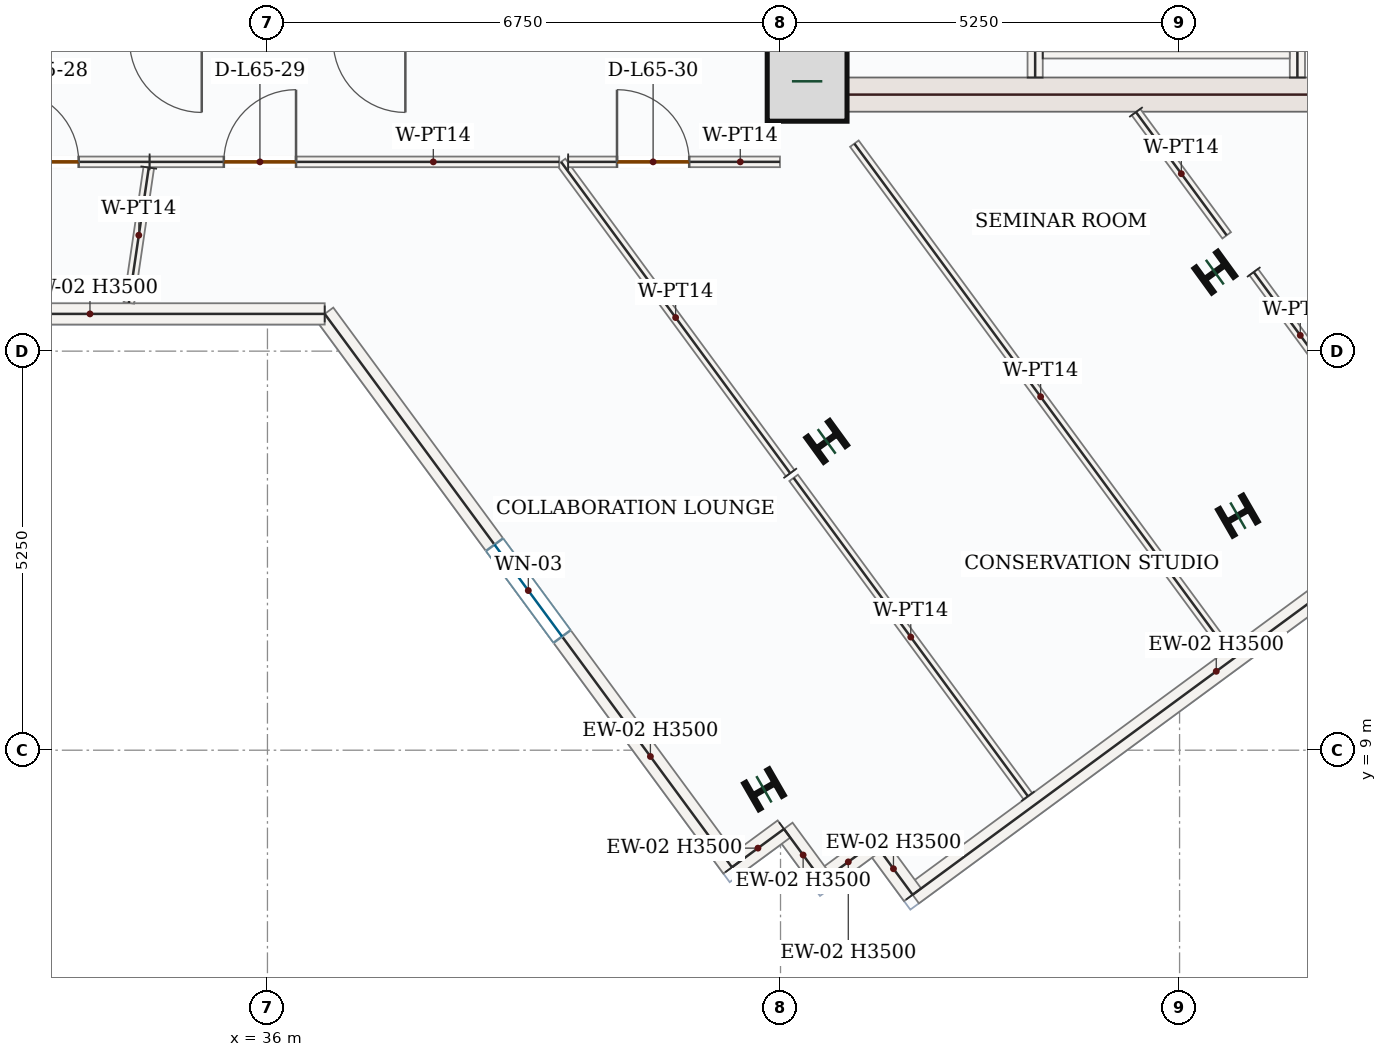
"""IFC4 building model, lengths in metres.
Left out: names, types, materials, properties, quantities, classifications, styles, units other than length and angle.
Written with IfcOpenShell. Run it as: python <this file> out.ifc"""

import sys

from ifc_helpers import new_model, si_unit, direction, frame, frame_2d, origin, origin_2d, place, context, subcontext, project, spatial, rectangle, i_section, extrude, source, transform, mapped, element, fill, save


model = new_model("IFC4")
c1 = context("Model", 3, precision=1e-05, world=origin(), true_north=direction((0.0, 1.0)))
c2 = subcontext(c1, "Body", "Model", "MODEL_VIEW")
j1 = project(units=[si_unit("LENGTHUNIT", "METRE"), si_unit("PLANEANGLEUNIT", "RADIAN")], contexts=[c1])
p1 = place(None, origin())
s1 = spatial("IfcSite", under=j1, at=p1, CompositionType="ELEMENT")
p2 = place(p1, origin())
s2 = spatial("IfcBuilding", under=s1, at=p2, CompositionType="ELEMENT")
p3 = place(p2, frame((0.0, 0.0, 272.85)))
s3 = spatial("IfcBuildingStorey", under=s2, at=p3, CompositionType="ELEMENT", Elevation=272.85)
p4 = place(p3, frame((42.975, 17.4, 0.0), z_axis=(0.0, 0.0, 1.0), x_axis=(0.0, 1.0, 0.0)))
e1 = element("IfcWall", 1, at=p4, inside=s3, PredefinedType="SHEAR", context=c2, shape_type="SweptSolid", body=[
    extrude(rectangle(XDim=8.55, YDim=0.45, at=frame_2d((4.275, 0.0))), origin(), (0.0, 0.0, 1.0), 3.5),
])
p5 = place(p4, frame((6.65, 0.0, 0.0)))
e2 = element("IfcOpeningElement", 2, at=p5, cuts=e1, PredefinedType="OPENING", context=c2, shape_type="SweptSolid", body=[
    extrude(rectangle(XDim=1.1, YDim=2.2, at=frame_2d((0.55, 1.1))), frame((0.0, 0.235, 0.0), z_axis=(0.0, -1.0, 0.0), x_axis=(1.0, 0.0, 0.0)), (0.0, 0.0, 1.0), 0.47),
])
p6 = place(p4, frame((1.75, 0.0, 0.0)))
e3 = element("IfcOpeningElement", 3, at=p6, cuts=e1, PredefinedType="OPENING", context=c2, shape_type="SweptSolid", body=[
    extrude(rectangle(XDim=1.3, YDim=2.2, at=frame_2d((0.65, 1.1))), frame((0.0, 0.235, 0.0), z_axis=(0.0, -1.0, 0.0), x_axis=(1.0, 0.0, 0.0)), (0.0, 0.0, 1.0), 0.47),
])
p7 = place(p4, frame((4.3, 0.0, 0.0)))
e4 = element("IfcOpeningElement", 4, at=p7, cuts=e1, PredefinedType="OPENING", context=c2, shape_type="SweptSolid", body=[
    extrude(rectangle(XDim=0.88, YDim=2.1, at=frame_2d((0.44, 1.05))), frame((0.0, 0.235, 0.0), z_axis=(0.0, -1.0, 0.0), x_axis=(1.0, 0.0, 0.0)), (0.0, 0.0, 1.0), 0.47),
])
m1 = source(origin(), c2, "Body", "SweptSolid", [
    extrude(rectangle(XDim=7.1, YDim=0.45, at=frame_2d((3.55, 0.0))), origin(), (0.0, 0.0, 1.0), 3.5),
])
p8 = place(p3, frame((43.2, 17.625, 0.0), z_axis=(0.0, 0.0, 1.0), x_axis=(1.0, 0.0, 0.0)))
e5 = element("IfcWall", 5, at=p8, inside=s3, PredefinedType="SHEAR", context=c2, shape_type="MappedRepresentation", body=[
    mapped(m1, transform((0.0, 0.0, 0.0), x_axis=(1.0, 0.0, 0.0), y_axis=(0.0, 1.0, 0.0), z_axis=(0.0, 0.0, 1.0), scale=1.0)),
])
m2 = source(origin(), c2, "Body", "SweptSolid", [
    extrude(rectangle(XDim=1.05, YDim=1.05, at=origin_2d()), origin(), (0.0, 0.0, 1.0), 3.75),
])
p9 = place(p3, frame((43.1, 17.8, 0.0), z_axis=(0.0, 0.0, 1.0), x_axis=(1.0, 0.0, 0.0)))
e6 = element("IfcColumn", 6, at=p9, inside=s3, PredefinedType="COLUMN", context=c2, shape_type="MappedRepresentation", body=[
    mapped(m2, transform((0.0, 0.0, 0.0), x_axis=(1.0, 0.0, 0.0), y_axis=(0.0, 1.0, 0.0), z_axis=(0.0, 0.0, 1.0), scale=1.0)),
])
m3 = source(origin(), c2, "Body", "SweptSolid", [
    extrude(i_section(OverallWidth=0.399, OverallDepth=0.386, WebThickness=0.021, FlangeThickness=0.033, FilletRadius=0.018, at=origin_2d()), origin(), (0.0, 0.0, 1.0), 3.75),
])
for number, where, z_axis, x_axis in (
    (7, (43.357, 13.063, 0.0), (0.0, 0.0, 1.0), (-0.588, 0.809, 0.0)),
    (8, (48.464, 15.289, 0.0), (0.0, 0.0, 1.0), (-0.588, 0.809, 0.0)),
    (9, (42.532, 8.486, 0.0), (0.0, 0.0, 1.0), (-0.5, 0.866, 0.0)),
    (10, (48.768, 12.086, 0.0), (0.0, 0.0, 1.0), (-0.5, 0.866, 0.0)),
):
    element("IfcColumn", number, at=place(p3, frame(where, z_axis=z_axis, x_axis=x_axis)), inside=s3, PredefinedType="COLUMN", context=c2, shape_type="MappedRepresentation", body=[
        mapped(m3, transform((0.0, 0.0, 0.0), x_axis=(1.0, 0.0, 0.0), y_axis=(0.0, 1.0, 0.0), z_axis=(0.0, 0.0, 1.0), scale=1.0)),
    ])
m4 = source(origin(), c2, "Body", "SweptSolid", [
    extrude(rectangle(XDim=9.92, YDim=0.28, at=frame_2d((4.96, 0.0))), origin(), (0.0, 0.0, 1.0), 3.5),
])
p10 = place(p3, frame((52.478, 12.978, 0.0), z_axis=(0.0, 0.0, 1.0), x_axis=(-0.805418797839, -0.592706132994, 0.0)))
e11 = element("IfcWall", 11, at=p10, inside=s3, PredefinedType="SOLIDWALL", context=c2, shape_type="MappedRepresentation", body=[
    mapped(m4, transform((0.0, 0.0, 0.0), x_axis=(1.0, 0.0, 0.0), y_axis=(0.0, 1.0, 0.0), z_axis=(0.0, 0.0, 1.0), scale=1.0)),
])
m5 = source(origin(), c2, "Body", "SweptSolid", [
    extrude(rectangle(XDim=0.85, YDim=0.28, at=frame_2d((0.425, 0.0))), origin(), (0.0, 0.0, 1.0), 3.5),
])
for number, where, z_axis, x_axis in (
    (12, (44.488, 7.098, 0.0), (0.0, 0.0, 1.0), (-0.593, 0.805, 0.0)),
    (13, (43.984, 7.783, 0.0), (0.0, 0.0, 1.0), (-0.805, -0.593, 0.0)),
):
    element("IfcWall", number, at=place(p3, frame(where, z_axis=z_axis, x_axis=x_axis)), inside=s3, PredefinedType="SOLIDWALL", context=c2, shape_type="MappedRepresentation", body=[
        mapped(m5, transform((0.0, 0.0, 0.0), x_axis=(1.0, 0.0, 0.0), y_axis=(0.0, 1.0, 0.0), z_axis=(0.0, 0.0, 1.0), scale=1.0)),
    ])
m6 = source(origin(), c2, "Body", "SweptSolid", [
    extrude(rectangle(XDim=0.85, YDim=0.28, at=frame_2d((0.425, 0.0))), origin(), (0.0, 0.0, 1.0), 3.5),
])
for number, where, z_axis, x_axis in (
    (14, (43.299, 7.279, 0.0), (0.0, 0.0, 1.0), (-0.593, 0.805, 0.0)),
    (15, (42.796, 7.963, 0.0), (0.0, 0.0, 1.0), (-0.805, -0.593, 0.0)),
):
    element("IfcWall", number, at=place(p3, frame(where, z_axis=z_axis, x_axis=x_axis)), inside=s3, PredefinedType="SOLIDWALL", context=c2, shape_type="MappedRepresentation", body=[
        mapped(m6, transform((0.0, 0.0, 0.0), x_axis=(1.0, 0.0, 0.0), y_axis=(0.0, 1.0, 0.0), z_axis=(0.0, 0.0, 1.0), scale=1.0)),
    ])
p11 = place(p3, frame((42.111, 7.46, 0.0), z_axis=(0.0, 0.0, 1.0), x_axis=(-0.592715239748, 0.805412096117, 0.0)))
e16 = element("IfcWall", 16, at=p11, inside=s3, PredefinedType="SOLIDWALL", context=c2, shape_type="SweptSolid", body=[
    extrude(rectangle(XDim=9.039, YDim=0.28, at=frame_2d((4.52, 0.0))), origin(), (0.0, 0.0, 1.0), 3.5),
])
p12 = place(p11, frame((3.77, 0.0, 0.85)))
e17 = element("IfcOpeningElement", 17, at=p12, cuts=e16, PredefinedType="OPENING", context=c2, shape_type="SweptSolid", body=[
    extrude(rectangle(XDim=1.5, YDim=1.5, at=frame_2d((0.75, 0.75))), frame((0.0, 0.15, 0.0), z_axis=(0.0, -1.0, 0.0), x_axis=(1.0, 0.0, 0.0)), (0.0, 0.0, 1.0), 0.3),
])
m7 = source(origin(), c2, "Body", "SweptSolid", [
    extrude(rectangle(XDim=6.177, YDim=0.28, at=frame_2d((3.088, 0.0))), origin(), (0.0, 0.0, 1.0), 3.5),
])
p13 = place(p3, frame((36.753, 14.74, 0.0), z_axis=(0.0, 0.0, 1.0), x_axis=(-1.0, 0.0, 0.0)))
e18 = element("IfcWall", 18, at=p13, inside=s3, PredefinedType="SOLIDWALL", context=c2, shape_type="MappedRepresentation", body=[
    mapped(m7, transform((0.0, 0.0, 0.0), x_axis=(1.0, 0.0, 0.0), y_axis=(0.0, 1.0, 0.0), z_axis=(0.0, 0.0, 1.0), scale=1.0)),
])
m8 = source(origin(), c2, "Body", "SweptSolid", [
    extrude(rectangle(XDim=7.87, YDim=0.2, at=frame_2d((3.935, 0.0))), origin(), (0.0, 0.0, 1.0), 3.5),
])
p14 = place(p3, frame((49.55, 17.85, 0.0), z_axis=(0.0, 0.0, 1.0), x_axis=(0.0, 1.0, 0.0)))
e19 = element("IfcWall", 19, at=p14, inside=s3, PredefinedType="SOLIDWALL", context=c2, shape_type="MappedRepresentation", body=[
    mapped(m8, transform((0.0, 0.0, 0.0), x_axis=(1.0, 0.0, 0.0), y_axis=(0.0, 1.0, 0.0), z_axis=(0.0, 0.0, 1.0), scale=1.0)),
])
p15 = place(p3, frame((46.1, 17.85, 0.0), z_axis=(0.0, 0.0, 1.0), x_axis=(0.0, 1.0, 0.0)))
e20 = element("IfcWall", 20, at=p15, inside=s3, PredefinedType="SOLIDWALL", context=c2, shape_type="SweptSolid", body=[
    extrude(rectangle(XDim=8.0, YDim=0.2, at=frame_2d((4.0, 0.0))), origin(), (0.0, 0.0, 1.0), 3.5),
])
p16 = place(p15, frame((6.3, 0.0, 0.0)))
e21 = element("IfcOpeningElement", 21, at=p16, cuts=e20, PredefinedType="OPENING", context=c2, shape_type="SweptSolid", body=[
    extrude(rectangle(XDim=1.05, YDim=2.15, at=frame_2d((0.525, 1.075))), frame((0.0, 0.11, 0.0), z_axis=(0.0, -1.0, 0.0), x_axis=(1.0, 0.0, 0.0)), (0.0, 0.0, 1.0), 0.22),
])
m9 = source(origin(), c2, "Body", "SweptSolid", [
    extrude(rectangle(XDim=3.25, YDim=0.2, at=frame_2d((1.625, 0.0))), origin(), (0.0, 0.0, 1.0), 3.5),
])
p17 = place(p3, frame((46.2, 18.2, 0.0), z_axis=(0.0, 0.0, 1.0), x_axis=(1.0, 0.0, 0.0)))
e22 = element("IfcWall", 22, at=p17, inside=s3, PredefinedType="SOLIDWALL", context=c2, shape_type="MappedRepresentation", body=[
    mapped(m9, transform((0.0, 0.0, 0.0), x_axis=(1.0, 0.0, 0.0), y_axis=(0.0, 1.0, 0.0), z_axis=(0.0, 0.0, 1.0), scale=1.0)),
])
m10 = source(origin(), c2, "Body", "SweptSolid", [
    extrude(rectangle(XDim=8.268, YDim=0.14, at=frame_2d((4.134, 0.0))), origin(), (0.0, 0.0, 1.0), 3.5),
])
p18 = place(p3, frame((48.622, 10.321, 0.0), z_axis=(0.0, 0.0, 1.0), x_axis=(-0.592718477136, 0.805409713663, 0.0)))
e23 = element("IfcWall", 23, at=p18, inside=s3, PredefinedType="PARTITIONING", context=c2, shape_type="MappedRepresentation", body=[
    mapped(m10, transform((0.0, 0.0, 0.0), x_axis=(1.0, 0.0, 0.0), y_axis=(0.0, 1.0, 0.0), z_axis=(0.0, 0.0, 1.0), scale=1.0)),
])
m11 = source(origin(), c2, "Body", "SweptSolid", [
    extrude(rectangle(XDim=2.013, YDim=0.14, at=frame_2d((1.006, 0.0))), origin(), (0.0, 0.0, 1.0), 3.5),
])
p19 = place(p3, frame((47.427, 17.395, 0.0), z_axis=(0.0, 0.0, 1.0), x_axis=(0.592698341467, -0.80542453155, 0.0)))
e24 = element("IfcWall", 24, at=p19, inside=s3, PredefinedType="PARTITIONING", context=c2, shape_type="MappedRepresentation", body=[
    mapped(m11, transform((0.0, 0.0, 0.0), x_axis=(1.0, 0.0, 0.0), y_axis=(0.0, 1.0, 0.0), z_axis=(0.0, 0.0, 1.0), scale=1.0)),
])
p20 = place(p3, frame((48.975, 15.29, 0.0), z_axis=(0.0, 0.0, 1.0), x_axis=(0.592735674873, -0.805397057192, 0.0)))
e25 = element("IfcWall", 25, at=p20, inside=s3, PredefinedType="PARTITIONING", context=c2, shape_type="SweptSolid", body=[
    extrude(rectangle(XDim=3.793, YDim=0.14, at=frame_2d((1.896, 0.0))), origin(), (0.0, 0.0, 1.0), 3.5),
])
p21 = place(p20, frame((2.218, 0.0, 0.0)))
e26 = element("IfcOpeningElement", 26, at=p21, cuts=e25, PredefinedType="OPENING", context=c2, shape_type="SweptSolid", body=[
    extrude(rectangle(XDim=0.95, YDim=2.15, at=frame_2d((0.475, 1.075))), frame((0.0, 0.08, 0.0), z_axis=(0.0, -1.0, 0.0), x_axis=(1.0, 0.0, 0.0)), (0.0, 0.0, 1.0), 0.16),
])
m12 = source(origin(), c2, "Body", "SweptSolid", [
    extrude(rectangle(XDim=5.2, YDim=0.14, at=frame_2d((2.6, 0.0))), origin(), (0.0, 0.0, 1.0), 3.5),
])
p22 = place(p3, frame((46.005, 8.394, 0.0), z_axis=(0.0, 0.0, 1.0), x_axis=(-0.592704087561, 0.805420303065, 0.0)))
e27 = element("IfcWall", 27, at=p22, inside=s3, PredefinedType="PARTITIONING", context=c2, shape_type="MappedRepresentation", body=[
    mapped(m12, transform((0.0, 0.0, 0.0), x_axis=(1.0, 0.0, 0.0), y_axis=(0.0, 1.0, 0.0), z_axis=(0.0, 0.0, 1.0), scale=1.0)),
])
m13 = source(origin(), c2, "Body", "SweptSolid", [
    extrude(rectangle(XDim=5.086, YDim=0.14, at=frame_2d((2.543, 0.0))), origin(), (0.0, 0.0, 1.0), 3.5),
])
p23 = place(p3, frame((42.877, 12.644, 0.0), z_axis=(0.0, 0.0, 1.0), x_axis=(-0.592678177251, 0.805439369668, 0.0)))
e28 = element("IfcWall", 28, at=p23, inside=s3, PredefinedType="PARTITIONING", context=c2, shape_type="MappedRepresentation", body=[
    mapped(m13, transform((0.0, 0.0, 0.0), x_axis=(1.0, 0.0, 0.0), y_axis=(0.0, 1.0, 0.0), z_axis=(0.0, 0.0, 1.0), scale=1.0)),
])
p24 = place(p3, frame((39.956, 16.74, 0.0), z_axis=(0.0, 0.0, 1.0), x_axis=(0.999999996161, 8.7619381e-05, 0.0)))
e29 = element("IfcWall", 29, at=p24, inside=s3, PredefinedType="PARTITIONING", context=c2, shape_type="SweptSolid", body=[
    extrude(rectangle(XDim=2.786, YDim=0.14, at=frame_2d((1.393, 0.0))), origin(), (0.0, 0.0, 1.0), 3.5),
])
p25 = place(p24, frame((0.643, 0.0, 0.0)))
e30 = element("IfcOpeningElement", 30, at=p25, cuts=e29, PredefinedType="OPENING", context=c2, shape_type="SweptSolid", body=[
    extrude(rectangle(XDim=0.95, YDim=2.15, at=frame_2d((0.475, 1.075))), frame((0.0, 0.08, 0.0), z_axis=(0.0, -1.0, 0.0), x_axis=(1.0, 0.0, 0.0)), (0.0, 0.0, 1.0), 0.16),
])
p26 = place(p3, frame((29.258, 16.74, 0.0), z_axis=(0.0, 0.0, 1.0), x_axis=(0.999999998895, -4.7021207e-05, 0.0)))
e31 = element("IfcWall", 31, at=p26, inside=s3, PredefinedType="PARTITIONING", context=c2, shape_type="SweptSolid", body=[
    extrude(rectangle(XDim=5.192, YDim=0.14, at=frame_2d((2.596, 0.0))), origin(), (0.0, 0.0, 1.0), 3.5),
])
p27 = place(p26, frame((3.309, 0.0, 0.0)))
e32 = element("IfcOpeningElement", 32, at=p27, cuts=e31, PredefinedType="OPENING", context=c2, shape_type="SweptSolid", body=[
    extrude(rectangle(XDim=0.95, YDim=2.15, at=frame_2d((0.475, 1.075))), frame((0.0, 0.08, 0.0), z_axis=(0.0, -1.0, 0.0), x_axis=(1.0, 0.0, 0.0)), (0.0, 0.0, 1.0), 0.16),
])
m14 = source(origin(), c2, "Body", "SweptSolid", [
    extrude(rectangle(XDim=1.799, YDim=0.14, at=frame_2d((0.9, 0.0))), origin(), (0.0, 0.0, 1.0), 3.5),
])
p28 = place(p3, frame((34.439, 16.665, 0.0), z_axis=(0.0, 0.0, 1.0), x_axis=(-0.14573227875, -0.989324063657, 0.0)))
e33 = element("IfcWall", 33, at=p28, inside=s3, PredefinedType="PARTITIONING", context=c2, shape_type="MappedRepresentation", body=[
    mapped(m14, transform((0.0, 0.0, 0.0), x_axis=(1.0, 0.0, 0.0), y_axis=(0.0, 1.0, 0.0), z_axis=(0.0, 0.0, 1.0), scale=1.0)),
])
p29 = place(p3, frame((34.45, 16.74, 0.0), z_axis=(0.0, 0.0, 1.0), x_axis=(1.0, 0.0, 0.0)))
e34 = element("IfcWall", 34, at=p29, inside=s3, PredefinedType="PARTITIONING", context=c2, shape_type="SweptSolid", body=[
    extrude(rectangle(XDim=5.388, YDim=0.14, at=frame_2d((2.694, 0.0))), origin(), (0.0, 0.0, 1.0), 3.5),
])
p30 = place(p29, frame((0.976, 0.0, 0.0)))
e35 = element("IfcOpeningElement", 35, at=p30, cuts=e34, PredefinedType="OPENING", context=c2, shape_type="SweptSolid", body=[
    extrude(rectangle(XDim=0.95, YDim=2.15, at=frame_2d((0.475, 1.075))), frame((0.0, 0.08, 0.0), z_axis=(0.0, -1.0, 0.0), x_axis=(1.0, 0.0, 0.0)), (0.0, 0.0, 1.0), 0.16),
])
m15 = source(origin(), c2, "Body", "SweptSolid", [
    extrude(rectangle(XDim=1.5, YDim=1.5, at=frame_2d((0.75, 0.75))), frame((0.0, 0.03, 0.0), z_axis=(0.0, -1.0, 0.0), x_axis=(1.0, 0.0, 0.0)), (0.0, 0.0, 1.0), 0.06),
])
p31 = place(p12, origin())
e36 = element("IfcWindow", 36, at=p31, inside=s3, PartitioningType="SINGLE_PANEL", PredefinedType="WINDOW", context=c2, shape_type="MappedRepresentation", body=[
    mapped(m15, transform((0.0, 0.0, 0.0), x_axis=(1.0, 0.0, 0.0), y_axis=(0.0, 1.0, 0.0), z_axis=(0.0, 0.0, 1.0), scale=1.0)),
])
fill(e17, e36)
m16 = source(origin(), c2, "Body", "SweptSolid", [
    extrude(rectangle(XDim=0.95, YDim=2.15, at=frame_2d((0.475, 1.075))), frame((0.0, 0.025, 0.0), z_axis=(0.0, -1.0, 0.0), x_axis=(1.0, 0.0, 0.0)), (0.0, 0.0, 1.0), 0.05),
])
p32 = place(p27, origin())
e37 = element("IfcDoor", 37, at=p32, inside=s3, OperationType="SINGLE_SWING_LEFT", PredefinedType="DOOR", context=c2, shape_type="MappedRepresentation", body=[
    mapped(m16, transform((0.0, 0.0, 0.0), x_axis=(1.0, 0.0, 0.0), y_axis=(0.0, 1.0, 0.0), z_axis=(0.0, 0.0, 1.0), scale=1.0)),
])
fill(e32, e37)
p33 = place(p30, origin())
e38 = element("IfcDoor", 38, at=p33, inside=s3, OperationType="SINGLE_SWING_RIGHT", PredefinedType="DOOR", context=c2, shape_type="MappedRepresentation", body=[
    mapped(m16, transform((0.0, 0.0, 0.0), x_axis=(1.0, 0.0, 0.0), y_axis=(0.0, 1.0, 0.0), z_axis=(0.0, 0.0, 1.0), scale=1.0)),
])
fill(e35, e38)
p34 = place(p25, origin())
e39 = element("IfcDoor", 39, at=p34, inside=s3, OperationType="SINGLE_SWING_LEFT", PredefinedType="DOOR", context=c2, shape_type="MappedRepresentation", body=[
    mapped(m16, transform((0.0, 0.0, 0.0), x_axis=(1.0, 0.0, 0.0), y_axis=(0.0, 1.0, 0.0), z_axis=(0.0, 0.0, 1.0), scale=1.0)),
])
fill(e30, e39)
save(model, sys.argv[1])
